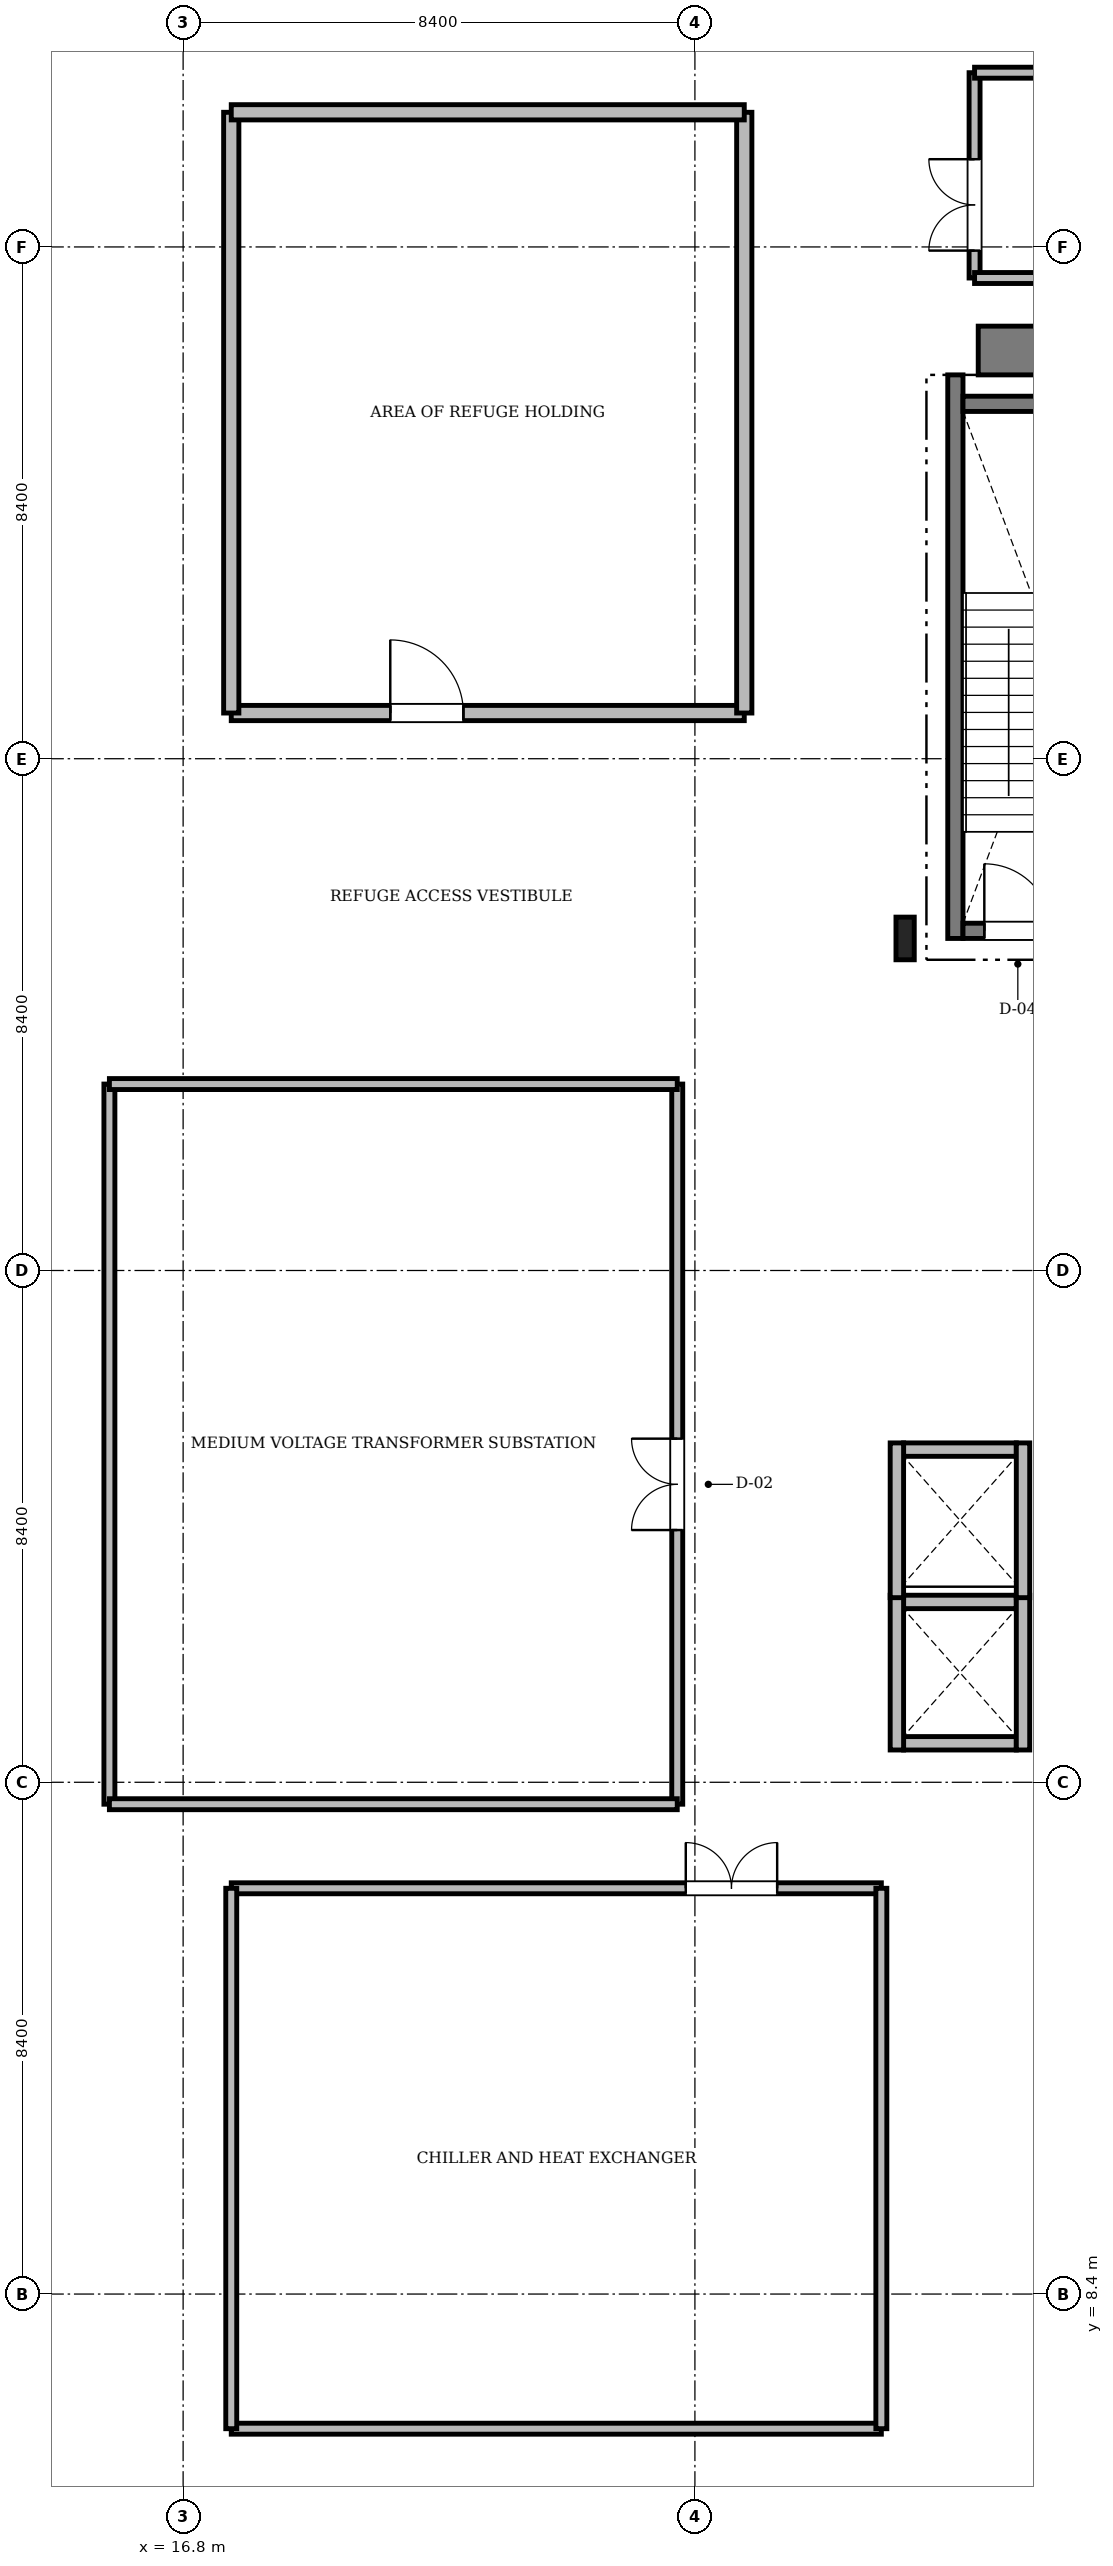
"""IFC4 building model, lengths in metres.
Left out: names, types, materials, properties, quantities, classifications, styles, units other than length and angle.
Written with IfcOpenShell. Run it as: python <this file> out.ifc"""

import sys

from ifc_helpers import new_model, si_unit, direction, frame, frame_2d, origin, origin_2d, place, context, subcontext, project, spatial, rectangle, i_section, extrude, source, transform, mapped, element, fill, save


model = new_model("IFC4")
c1 = context("Model", 3, precision=1e-05, world=origin(), true_north=direction((0.0, 1.0)))
c2 = subcontext(c1, "Body", "Model", "MODEL_VIEW")
j1 = project(units=[si_unit("LENGTHUNIT", "METRE"), si_unit("PLANEANGLEUNIT", "RADIAN")], contexts=[c1])
p1 = place(None, origin())
s1 = spatial("IfcSite", under=j1, at=p1, CompositionType="ELEMENT")
p2 = place(p1, origin())
s2 = spatial("IfcBuilding", under=s1, at=p2, CompositionType="ELEMENT")
p3 = place(p2, frame((0.0, 0.0, 237.3)))
s3 = spatial("IfcBuildingStorey", under=s2, at=p3, CompositionType="ELEMENT", Elevation=237.3)
m1 = source(origin(), c2, "Body", "SweptSolid", [
    extrude(rectangle(XDim=17.52, YDim=0.8, at=frame_2d((8.76, 0.0))), origin(), (0.0, 0.0, 1.0), 4.75),
])
p4 = place(p3, frame((29.85, 40.3, 0.0), z_axis=(0.0, 0.0, 1.0), x_axis=(1.0, 0.0, 0.0)))
e1 = element("IfcWall", 1, at=p4, inside=s3, PredefinedType="SHEAR", context=c2, shape_type="MappedRepresentation", body=[
    mapped(m1, transform((0.0, 0.0, 0.0), scale=1.0)),
])
m2 = source(origin(), c2, "Body", "SweptSolid", [
    extrude(i_section(OverallWidth=0.3, OverallDepth=0.7, WebThickness=0.017, FlangeThickness=0.032, FilletRadius=0.027, at=origin_2d()), origin(), (0.0, 0.0, 1.0), 4.75),
])
p5 = place(p3, frame((28.65, 30.65, 0.0), z_axis=(0.0, 0.0, 1.0), x_axis=(1.0, 0.0, 0.0)))
e2 = element("IfcColumn", 2, at=p5, inside=s3, PredefinedType="COLUMN", context=c2, shape_type="MappedRepresentation", body=[
    mapped(m2, transform((0.0, 0.0, 0.0), scale=1.0)),
])
m3 = source(origin(), c2, "Body", "SweptSolid", [
    extrude(rectangle(XDim=1.4, YDim=1.4, at=origin_2d()), origin(), (0.0, 0.0, 1.0), 6.543),
])
for number, where, z_axis, x_axis in (
    (3, (12.25, 36.54, 0.0), (0.688, 0.0, 0.726), (0.0, 1.0, 0.0)),
    (4, (12.25, 13.86, 0.0), (0.688, 0.0, 0.726), (0.0, 1.0, 0.0)),
):
    element("IfcColumn", number, at=place(p3, frame(where, z_axis=z_axis, x_axis=x_axis)), inside=s3, PredefinedType="COLUMN", context=c2, shape_type="MappedRepresentation", body=[
        mapped(m3, transform((0.0, 0.0, 0.0), scale=1.0)),
    ])
m4 = source(origin(), c2, "Body", "SweptSolid", [
    extrude(i_section(OverallWidth=0.409, OverallDepth=0.417, WebThickness=0.021, FlangeThickness=0.033, FilletRadius=0.015, at=origin_2d()), origin(), (0.0, 0.0, 1.0), 6.543),
])
for number, where, z_axis, x_axis in (
    (5, (12.25, 43.45, 0.0), (0.688, 0.0, 0.726), (0.0, 1.0, 0.0)),
    (6, (12.25, 28.9, 0.0), (0.688, 0.0, 0.726), (0.0, 1.0, 0.0)),
    (7, (12.25, 21.5, 0.0), (0.688, 0.0, 0.726), (0.0, 1.0, 0.0)),
    (8, (12.25, 6.95, 0.0), (0.688, 0.0, 0.726), (0.0, 1.0, 0.0)),
):
    element("IfcColumn", number, at=place(p3, frame(where, z_axis=z_axis, x_axis=x_axis)), inside=s3, PredefinedType="COLUMN", context=c2, shape_type="MappedRepresentation", body=[
        mapped(m4, transform((0.0, 0.0, 0.0), scale=1.0)),
    ])
m5 = source(origin(), c2, "Body", "SweptSolid", [
    extrude(rectangle(XDim=9.25, YDim=0.25, at=frame_2d((4.625, 0.0))), origin(), (0.0, 0.0, 1.0), 5.2),
])
p6 = place(p3, frame((29.475, 30.65, 0.0), z_axis=(0.0, 0.0, 1.0), x_axis=(0.0, 1.0, 0.0)))
e9 = element("IfcWall", 9, at=p6, inside=s3, PredefinedType="SOLIDWALL", context=c2, shape_type="MappedRepresentation", body=[
    mapped(m5, transform((0.0, 0.0, 0.0), scale=1.0)),
])
m6 = source(origin(), c2, "Body", "SweptSolid", [
    extrude(rectangle(XDim=3.15, YDim=0.25, at=frame_2d((1.575, 0.0))), origin(), (0.0, 0.0, 1.0), 5.2),
])
p7 = place(p3, frame((29.6, 39.425, 0.0), z_axis=(0.0, 0.0, 1.0), x_axis=(1.0, 0.0, 0.0)))
e10 = element("IfcWall", 10, at=p7, inside=s3, PredefinedType="SOLIDWALL", context=c2, shape_type="MappedRepresentation", body=[
    mapped(m6, transform((0.0, 0.0, 0.0), scale=1.0)),
])
p8 = place(p3, frame((29.6, 30.775, 0.0), z_axis=(0.0, 0.0, 1.0), x_axis=(1.0, 0.0, 0.0)))
e11 = element("IfcWall", 11, at=p8, inside=s3, PredefinedType="SOLIDWALL", context=c2, shape_type="MappedRepresentation", body=[
    mapped(m6, transform((0.0, 0.0, 0.0), scale=1.0)),
])
m7 = source(origin(), c2, "Body", "SweptSolid", [
    extrude(rectangle(XDim=1.1, YDim=2.2, at=frame_2d((0.55, 1.1))), frame((0.0, 0.135, 0.0), z_axis=(0.0, -1.0, 0.0), x_axis=(1.0, 0.0, 0.0)), (0.0, 0.0, 1.0), 0.27),
])
p9 = place(p8, frame((0.35, 0.0, 0.0)))
e12 = element("IfcOpeningElement", 12, at=p9, cuts=e11, PredefinedType="OPENING", context=c2, shape_type="MappedRepresentation", body=[
    mapped(m7, transform((0.0, 0.0, 0.0), scale=1.0)),
])
m8 = source(origin(), c2, "Body", "SweptSolid", [
    extrude(rectangle(XDim=1.85, YDim=0.22, at=frame_2d((0.925, 0.0))), origin(), (0.0, 0.0, 1.0), 4.75),
])
for number, where, z_axis, x_axis in (
    (13, (28.625, 17.44, 0.0), (0.0, 0.0, 1.0), (1.0, 0.0, 0.0)),
    (14, (28.625, 19.76, 0.0), (0.0, 0.0, 1.0), (1.0, 0.0, 0.0)),
):
    element("IfcWall", number, at=place(p3, frame(where, z_axis=z_axis, x_axis=x_axis)), inside=s3, PredefinedType="SOLIDWALL", context=c2, shape_type="MappedRepresentation", body=[
        mapped(m8, transform((0.0, 0.0, 0.0), scale=1.0)),
    ])
m9 = source(origin(), c2, "Body", "SweptSolid", [
    extrude(rectangle(XDim=2.54, YDim=0.22, at=frame_2d((1.27, 0.0))), origin(), (0.0, 0.0, 1.0), 4.75),
])
for number, where, z_axis, x_axis in (
    (15, (28.515, 17.33, 0.0), (0.0, 0.0, 1.0), (0.0, 1.0, 0.0)),
    (16, (30.585, 17.33, 0.0), (0.0, 0.0, 1.0), (0.0, 1.0, 0.0)),
):
    element("IfcWall", number, at=place(p3, frame(where, z_axis=z_axis, x_axis=x_axis)), inside=s3, PredefinedType="SOLIDWALL", context=c2, shape_type="MappedRepresentation", body=[
        mapped(m9, transform((0.0, 0.0, 0.0), scale=1.0)),
    ])
p10 = place(p3, frame((28.625, 22.26, 0.0), z_axis=(0.0, 0.0, 1.0), x_axis=(1.0, 0.0, 0.0)))
e17 = element("IfcWall", 17, at=p10, inside=s3, PredefinedType="SOLIDWALL", context=c2, shape_type="MappedRepresentation", body=[
    mapped(m8, transform((0.0, 0.0, 0.0), scale=1.0)),
])
for number, where, z_axis, x_axis in (
    (18, (28.515, 19.83, 0.0), (0.0, 0.0, 1.0), (0.0, 1.0, 0.0)),
    (19, (30.585, 19.83, 0.0), (0.0, 0.0, 1.0), (0.0, 1.0, 0.0)),
):
    element("IfcWall", number, at=place(p3, frame(where, z_axis=z_axis, x_axis=x_axis)), inside=s3, PredefinedType="SOLIDWALL", context=c2, shape_type="MappedRepresentation", body=[
        mapped(m9, transform((0.0, 0.0, 0.0), scale=1.0)),
    ])
m10 = source(origin(), c2, "Body", "SweptSolid", [
    extrude(rectangle(XDim=11.82, YDim=0.18, at=frame_2d((5.91, 0.0))), origin(), (0.0, 0.0, 1.0), 4.192),
])
p11 = place(p3, frame((24.91, 16.44, 0.0), z_axis=(0.0, 0.0, 1.0), x_axis=(0.0, 1.0, 0.0)))
e20 = element("IfcWall", 20, at=p11, inside=s3, PredefinedType="PARTITIONING", context=c2, shape_type="MappedRepresentation", body=[
    mapped(m10, transform((0.0, 0.0, 0.0), scale=1.0)),
])
m11 = source(origin(), c2, "Body", "SweptSolid", [
    extrude(rectangle(XDim=1.5, YDim=2.3, at=frame_2d((0.75, 1.15))), frame((0.0, 0.1, 0.0), z_axis=(0.0, -1.0, 0.0), x_axis=(1.0, 0.0, 0.0)), (0.0, 0.0, 1.0), 0.2),
])
p12 = place(p11, frame((4.5, 0.0, 0.0)))
e21 = element("IfcOpeningElement", 21, at=p12, cuts=e20, PredefinedType="OPENING", context=c2, shape_type="MappedRepresentation", body=[
    mapped(m11, transform((0.0, 0.0, 0.0), scale=1.0)),
])
m12 = source(origin(), c2, "Body", "SweptSolid", [
    extrude(rectangle(XDim=10.67, YDim=0.18, at=frame_2d((5.335, 0.0))), origin(), (0.0, 0.0, 1.0), 4.192),
])
p13 = place(p3, frame((17.59, 15.06, 0.0), z_axis=(0.0, 0.0, 1.0), x_axis=(1.0, 0.0, 0.0)))
e22 = element("IfcWall", 22, at=p13, inside=s3, PredefinedType="PARTITIONING", context=c2, shape_type="MappedRepresentation", body=[
    mapped(m12, transform((0.0, 0.0, 0.0), scale=1.0)),
])
p14 = place(p13, frame((7.46, 0.0, 0.0)))
e23 = element("IfcOpeningElement", 23, at=p14, cuts=e22, PredefinedType="OPENING", context=c2, shape_type="MappedRepresentation", body=[
    mapped(m11, transform((0.0, 0.0, 0.0), scale=1.0)),
])
m13 = source(origin(), c2, "Body", "SweptSolid", [
    extrude(rectangle(XDim=8.42, YDim=0.25, at=frame_2d((4.21, 0.0))), origin(), (0.0, 0.0, 1.0), 4.192),
])
p15 = place(p3, frame((17.59, 34.35, 0.0), z_axis=(0.0, 0.0, 1.0), x_axis=(1.0, 0.0, 0.0)))
e24 = element("IfcWall", 24, at=p15, inside=s3, PredefinedType="SOLIDWALL", context=c2, shape_type="MappedRepresentation", body=[
    mapped(m13, transform((0.0, 0.0, 0.0), scale=1.0)),
])
m14 = source(origin(), c2, "Body", "SweptSolid", [
    extrude(rectangle(XDim=1.2, YDim=2.2, at=frame_2d((0.6, 1.1))), frame((0.0, 0.135, 0.0), z_axis=(0.0, -1.0, 0.0), x_axis=(1.0, 0.0, 0.0)), (0.0, 0.0, 1.0), 0.27),
])
p16 = place(p15, frame((2.61, 0.0, 0.0)))
e25 = element("IfcOpeningElement", 25, at=p16, cuts=e24, PredefinedType="OPENING", context=c2, shape_type="MappedRepresentation", body=[
    mapped(m14, transform((0.0, 0.0, 0.0), scale=1.0)),
])
m15 = source(origin(), c2, "Body", "SweptSolid", [
    extrude(rectangle(XDim=3.37, YDim=0.18, at=frame_2d((1.685, 0.0))), origin(), (0.0, 0.0, 1.0), 4.75),
])
p17 = place(p3, frame((29.79, 41.49, 0.0), z_axis=(0.0, 0.0, 1.0), x_axis=(0.0, 1.0, 0.0)))
e26 = element("IfcWall", 26, at=p17, inside=s3, PredefinedType="PARTITIONING", context=c2, shape_type="MappedRepresentation", body=[
    mapped(m15, transform((0.0, 0.0, 0.0), scale=1.0)),
])
p18 = place(p17, frame((0.45, 0.0, 0.0)))
e27 = element("IfcOpeningElement", 27, at=p18, cuts=e26, PredefinedType="OPENING", context=c2, shape_type="MappedRepresentation", body=[
    mapped(m11, transform((0.0, 0.0, 0.0), scale=1.0)),
])
m16 = source(origin(), c2, "Body", "SweptSolid", [
    extrude(rectangle(XDim=11.82, YDim=0.18, at=frame_2d((5.91, 0.0))), origin(), (0.0, 0.0, 1.0), 4.75),
])
p19 = place(p3, frame((15.59, 16.44, 0.0), z_axis=(0.0, 0.0, 1.0), x_axis=(0.0, 1.0, 0.0)))
e28 = element("IfcWall", 28, at=p19, inside=s3, PredefinedType="PARTITIONING", context=c2, shape_type="MappedRepresentation", body=[
    mapped(m16, transform((0.0, 0.0, 0.0), scale=1.0)),
])
m17 = source(origin(), c2, "Body", "SweptSolid", [
    extrude(rectangle(XDim=10.67, YDim=0.18, at=frame_2d((5.335, 0.0))), origin(), (0.0, 0.0, 1.0), 4.026),
])
p20 = place(p3, frame((17.59, 6.19, 0.0), z_axis=(0.0, 0.0, 1.0), x_axis=(1.0, 0.0, 0.0)))
e29 = element("IfcWall", 29, at=p20, inside=s3, PredefinedType="PARTITIONING", context=c2, shape_type="MappedRepresentation", body=[
    mapped(m17, transform((0.0, 0.0, 0.0), scale=1.0)),
])
m18 = source(origin(), c2, "Body", "SweptSolid", [
    extrude(rectangle(XDim=10.07, YDim=0.18, at=frame_2d((5.035, 0.0))), origin(), (0.0, 0.0, 1.0), 4.75),
])
for number, where, z_axis, x_axis in (
    (30, (29.79, 41.49, 0.0), (0.0, 0.0, 1.0), (1.0, 0.0, 0.0)),
    (31, (29.79, 44.86, 0.0), (0.0, 0.0, 1.0), (1.0, 0.0, 0.0)),
):
    element("IfcWall", number, at=place(p3, frame(where, z_axis=z_axis, x_axis=x_axis)), inside=s3, PredefinedType="PARTITIONING", context=c2, shape_type="MappedRepresentation", body=[
        mapped(m18, transform((0.0, 0.0, 0.0), scale=1.0)),
    ])
m19 = source(origin(), c2, "Body", "SweptSolid", [
    extrude(rectangle(XDim=9.86, YDim=0.25, at=frame_2d((4.93, 0.0))), origin(), (0.0, 0.0, 1.0), 4.026),
])
p21 = place(p3, frame((17.59, 34.35, 0.0), z_axis=(0.0, 0.0, 1.0), x_axis=(0.0, 1.0, 0.0)))
e32 = element("IfcWall", 32, at=p21, inside=s3, PredefinedType="SOLIDWALL", context=c2, shape_type="MappedRepresentation", body=[
    mapped(m19, transform((0.0, 0.0, 0.0), scale=1.0)),
])
m20 = source(origin(), c2, "Body", "SweptSolid", [
    extrude(rectangle(XDim=9.86, YDim=0.25, at=frame_2d((4.93, 0.0))), origin(), (0.0, 0.0, 1.0), 4.75),
])
p22 = place(p3, frame((26.01, 34.35, 0.0), z_axis=(0.0, 0.0, 1.0), x_axis=(0.0, 1.0, 0.0)))
e33 = element("IfcWall", 33, at=p22, inside=s3, PredefinedType="SOLIDWALL", context=c2, shape_type="MappedRepresentation", body=[
    mapped(m20, transform((0.0, 0.0, 0.0), scale=1.0)),
])
m21 = source(origin(), c2, "Body", "SweptSolid", [
    extrude(rectangle(XDim=9.32, YDim=0.18, at=frame_2d((4.66, 0.0))), origin(), (0.0, 0.0, 1.0), 4.026),
])
for number, where, z_axis, x_axis in (
    (34, (15.59, 16.44, 0.0), (0.0, 0.0, 1.0), (1.0, 0.0, 0.0)),
    (35, (15.59, 28.26, 0.0), (0.0, 0.0, 1.0), (1.0, 0.0, 0.0)),
):
    element("IfcWall", number, at=place(p3, frame(where, z_axis=z_axis, x_axis=x_axis)), inside=s3, PredefinedType="PARTITIONING", context=c2, shape_type="MappedRepresentation", body=[
        mapped(m21, transform((0.0, 0.0, 0.0), scale=1.0)),
    ])
m22 = source(origin(), c2, "Body", "SweptSolid", [
    extrude(rectangle(XDim=8.87, YDim=0.18, at=frame_2d((4.435, 0.0))), origin(), (0.0, 0.0, 1.0), 4.026),
])
p23 = place(p3, frame((17.59, 6.19, 0.0), z_axis=(0.0, 0.0, 1.0), x_axis=(0.0, 1.0, 0.0)))
e36 = element("IfcWall", 36, at=p23, inside=s3, PredefinedType="PARTITIONING", context=c2, shape_type="MappedRepresentation", body=[
    mapped(m22, transform((0.0, 0.0, 0.0), scale=1.0)),
])
m23 = source(origin(), c2, "Body", "SweptSolid", [
    extrude(rectangle(XDim=8.87, YDim=0.18, at=frame_2d((4.435, 0.0))), origin(), (0.0, 0.0, 1.0), 4.442),
])
p24 = place(p3, frame((28.26, 6.19, 0.0), z_axis=(0.0, 0.0, 1.0), x_axis=(0.0, 1.0, 0.0)))
e37 = element("IfcWall", 37, at=p24, inside=s3, PredefinedType="PARTITIONING", context=c2, shape_type="MappedRepresentation", body=[
    mapped(m23, transform((0.0, 0.0, 0.0), scale=1.0)),
])
m24 = source(origin(), c2, "Body", "SweptSolid", [
    extrude(rectangle(XDim=8.42, YDim=0.25, at=frame_2d((4.21, 0.0))), origin(), (0.0, 0.0, 1.0), 4.026),
])
p25 = place(p3, frame((17.59, 44.21, 0.0), z_axis=(0.0, 0.0, 1.0), x_axis=(1.0, 0.0, 0.0)))
e38 = element("IfcWall", 38, at=p25, inside=s3, PredefinedType="SOLIDWALL", context=c2, shape_type="MappedRepresentation", body=[
    mapped(m24, transform((0.0, 0.0, 0.0), scale=1.0)),
])
m25 = source(origin(), c2, "Body", "SweptSolid", [
    extrude(rectangle(XDim=1.1, YDim=2.2, at=frame_2d((0.55, 1.1))), frame((0.0, 0.025, 0.0), z_axis=(0.0, -1.0, 0.0), x_axis=(1.0, 0.0, 0.0)), (0.0, 0.0, 1.0), 0.05),
])
p26 = place(p9, origin())
e39 = element("IfcDoor", 39, at=p26, inside=s3, OperationType="SINGLE_SWING_LEFT", PredefinedType="DOOR", context=c2, shape_type="MappedRepresentation", body=[
    mapped(m25, transform((0.0, 0.0, 0.0), scale=1.0)),
])
fill(e12, e39)
m26 = source(origin(), c2, "Body", "SweptSolid", [
    extrude(rectangle(XDim=1.5, YDim=2.3, at=frame_2d((0.75, 1.15))), frame((0.0, 0.025, 0.0), z_axis=(0.0, -1.0, 0.0), x_axis=(1.0, 0.0, 0.0)), (0.0, 0.0, 1.0), 0.05),
])
p27 = place(p12, origin())
e40 = element("IfcDoor", 40, at=p27, inside=s3, OperationType="DOUBLE_DOOR_SINGLE_SWING", PredefinedType="DOOR", context=c2, shape_type="MappedRepresentation", body=[
    mapped(m26, transform((0.0, 0.0, 0.0), scale=1.0)),
])
fill(e21, e40)
p28 = place(p14, origin())
e41 = element("IfcDoor", 41, at=p28, inside=s3, OperationType="DOUBLE_DOOR_SINGLE_SWING", PredefinedType="DOOR", context=c2, shape_type="MappedRepresentation", body=[
    mapped(m26, transform((0.0, 0.0, 0.0), scale=1.0)),
])
fill(e23, e41)
m27 = source(origin(), c2, "Body", "SweptSolid", [
    extrude(rectangle(XDim=1.2, YDim=2.2, at=frame_2d((0.6, 1.1))), frame((0.0, 0.025, 0.0), z_axis=(0.0, -1.0, 0.0), x_axis=(1.0, 0.0, 0.0)), (0.0, 0.0, 1.0), 0.05),
])
p29 = place(p16, origin())
e42 = element("IfcDoor", 42, at=p29, inside=s3, OperationType="SINGLE_SWING_LEFT", PredefinedType="DOOR", context=c2, shape_type="MappedRepresentation", body=[
    mapped(m27, transform((0.0, 0.0, 0.0), scale=1.0)),
])
fill(e25, e42)
p30 = place(p18, origin())
e43 = element("IfcDoor", 43, at=p30, inside=s3, OperationType="DOUBLE_DOOR_SINGLE_SWING", PredefinedType="DOOR", context=c2, shape_type="MappedRepresentation", body=[
    mapped(m26, transform((0.0, 0.0, 0.0), scale=1.0)),
])
fill(e27, e43)
save(model, sys.argv[1])
